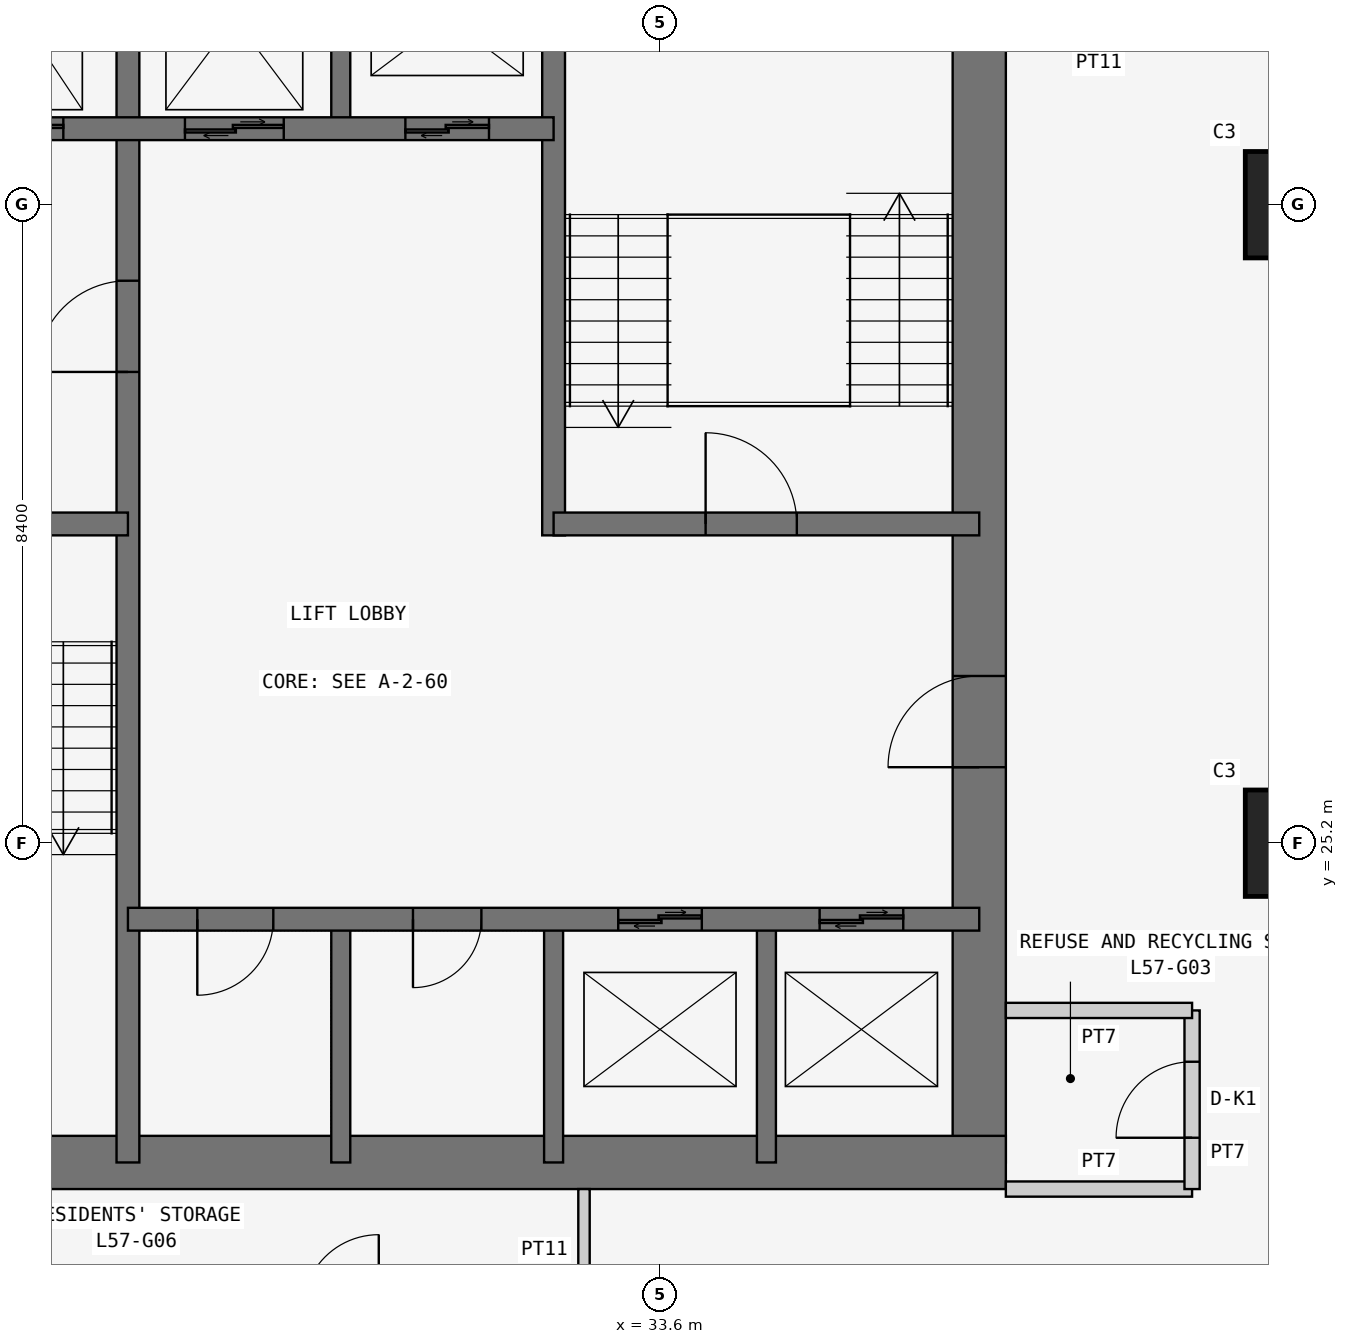
"""IFC4 building model, lengths in metres.
Left out: names, types, materials, properties, quantities, classifications, styles, units other than length and angle.
Written with IfcOpenShell. Run it as: python <this file> out.ifc"""

import sys

from ifc_helpers import new_model, si_unit, direction, frame, frame_2d, origin, origin_2d, place, context, subcontext, project, spatial, rectangle, extrude, element, fill, save


model = new_model("IFC4")
c1 = context("Model", 3, precision=1e-05, world=origin(), true_north=direction((0.0, 1.0)))
c2 = subcontext(c1, "Body", "Model", "MODEL_VIEW")
j1 = project(units=[si_unit("LENGTHUNIT", "METRE"), si_unit("PLANEANGLEUNIT", "RADIAN")], contexts=[c1])
p1 = place(None, origin())
s1 = spatial("IfcSite", under=j1, at=p1, CompositionType="ELEMENT")
p2 = place(p1, origin())
s2 = spatial("IfcBuilding", under=s1, at=p2, CompositionType="ELEMENT")
p3 = place(p2, frame((0.0, 0.0, 219.3)))
s3 = spatial("IfcBuildingStorey", under=s2, at=p3, CompositionType="ELEMENT", Elevation=219.3)
for number, where, z_axis, x_axis in (
    (1, (42.0, 25.2, 0.0), (0.0, 0.0, 1.0), (1.0, 0.0, 0.0)),
    (2, (42.0, 33.6, 0.0), (0.0, 0.0, 1.0), (1.0, 0.0, 0.0)),
):
    element("IfcColumn", number, at=place(p3, frame(where, z_axis=z_axis, x_axis=x_axis)), inside=s3, PredefinedType="COLUMN", context=c2, shape_type="SweptSolid", body=[
        extrude(rectangle(XDim=1.4, YDim=1.4, at=origin_2d()), origin(), (0.0, 0.0, 1.0), 3.6),
    ])
p4 = place(p3, frame((21.0, 21.0, 0.0), z_axis=(0.0, 0.0, 1.0), x_axis=(1.0, 0.0, 0.0)))
e3 = element("IfcWall", 3, at=p4, inside=s3, PredefinedType="SHEAR", context=c2, shape_type="SweptSolid", body=[
    extrude(rectangle(XDim=17.15, YDim=0.7, at=frame_2d((8.575, 0.0))), origin(), (0.0, 0.0, 1.0), 3.6),
])
p5 = place(p3, frame((37.8, 21.0, 0.0), z_axis=(0.0, 0.0, 1.0), x_axis=(0.0, 1.0, 0.0)))
e4 = element("IfcWall", 4, at=p5, inside=s3, PredefinedType="SHEAR", context=c2, shape_type="SweptSolid", body=[
    extrude(rectangle(XDim=17.15, YDim=0.7, at=frame_2d((8.575, 0.0))), origin(), (0.0, 0.0, 1.0), 3.6),
])
p6 = place(p5, frame((5.2, 0.0, 0.0)))
e5 = element("IfcOpeningElement", 5, at=p6, cuts=e4, PredefinedType="OPENING", context=c2, shape_type="SweptSolid", body=[
    extrude(rectangle(XDim=1.2, YDim=2.1, at=frame_2d((0.6, 1.05))), frame((0.0, 0.36, 0.0), z_axis=(0.0, -1.0, 0.0), x_axis=(1.0, 0.0, 0.0)), (0.0, 0.0, 1.0), 0.72),
])
p7 = place(p3, frame((26.6, 21.0, 0.0), z_axis=(0.0, 0.0, 1.0), x_axis=(0.0, 1.0, 0.0)))
e6 = element("IfcWall", 6, at=p7, inside=s3, PredefinedType="SHEAR", context=c2, shape_type="SweptSolid", body=[
    extrude(rectangle(XDim=16.8, YDim=0.3, at=frame_2d((8.4, 0.0))), origin(), (0.0, 0.0, 1.0), 3.6),
])
p8 = place(p7, frame((10.4, 0.0, 0.0)))
e7 = element("IfcOpeningElement", 7, at=p8, cuts=e6, PredefinedType="OPENING", context=c2, shape_type="SweptSolid", body=[
    extrude(rectangle(XDim=1.2, YDim=2.1, at=frame_2d((0.6, 1.05))), frame((0.0, 0.16, 0.0), z_axis=(0.0, -1.0, 0.0), x_axis=(1.0, 0.0, 0.0)), (0.0, 0.0, 1.0), 0.32),
])
p9 = place(p3, frame((21.0, 29.4, 0.0), z_axis=(0.0, 0.0, 1.0), x_axis=(1.0, 0.0, 0.0)))
e8 = element("IfcWall", 8, at=p9, inside=s3, PredefinedType="SHEAR", context=c2, shape_type="SweptSolid", body=[
    extrude(rectangle(XDim=5.6, YDim=0.3, at=frame_2d((2.8, 0.0))), origin(), (0.0, 0.0, 1.0), 3.6),
])
p10 = place(p9, frame((2.3, 0.0, 0.0)))
e9 = element("IfcOpeningElement", 9, at=p10, cuts=e8, PredefinedType="OPENING", context=c2, shape_type="SweptSolid", body=[
    extrude(rectangle(XDim=1.2, YDim=2.1, at=frame_2d((0.6, 1.05))), frame((0.0, 0.16, 0.0), z_axis=(0.0, -1.0, 0.0), x_axis=(1.0, 0.0, 0.0)), (0.0, 0.0, 1.0), 0.32),
])
p11 = place(p3, frame((21.0, 34.6, 0.0), z_axis=(0.0, 0.0, 1.0), x_axis=(1.0, 0.0, 0.0)))
e10 = element("IfcWall", 10, at=p11, inside=s3, PredefinedType="SHEAR", context=c2, shape_type="SweptSolid", body=[
    extrude(rectangle(XDim=11.2, YDim=0.3, at=frame_2d((5.6, 0.0))), origin(), (0.0, 0.0, 1.0), 3.6),
])
p12 = place(p11, frame((9.25, 0.0, 0.0)))
e11 = element("IfcOpeningElement", 11, at=p12, cuts=e10, PredefinedType="OPENING", context=c2, shape_type="SweptSolid", body=[
    extrude(rectangle(XDim=1.1, YDim=2.1, at=frame_2d((0.55, 1.05))), frame((0.0, 0.16, 0.0), z_axis=(0.0, -1.0, 0.0), x_axis=(1.0, 0.0, 0.0)), (0.0, 0.0, 1.0), 0.32),
])
p13 = place(p11, frame((1.0, 0.0, 0.0)))
e12 = element("IfcOpeningElement", 12, at=p13, cuts=e10, PredefinedType="OPENING", context=c2, shape_type="SweptSolid", body=[
    extrude(rectangle(XDim=1.1, YDim=2.1, at=frame_2d((0.55, 1.05))), frame((0.0, 0.16, 0.0), z_axis=(0.0, -1.0, 0.0), x_axis=(1.0, 0.0, 0.0)), (0.0, 0.0, 1.0), 0.32),
])
p14 = place(p11, frame((3.65, 0.0, 0.0)))
e13 = element("IfcOpeningElement", 13, at=p14, cuts=e10, PredefinedType="OPENING", context=c2, shape_type="SweptSolid", body=[
    extrude(rectangle(XDim=1.1, YDim=2.1, at=frame_2d((0.55, 1.05))), frame((0.0, 0.16, 0.0), z_axis=(0.0, -1.0, 0.0), x_axis=(1.0, 0.0, 0.0)), (0.0, 0.0, 1.0), 0.32),
])
p15 = place(p11, frame((6.35, 0.0, 0.0)))
e14 = element("IfcOpeningElement", 14, at=p15, cuts=e10, PredefinedType="OPENING", context=c2, shape_type="SweptSolid", body=[
    extrude(rectangle(XDim=1.3, YDim=2.1, at=frame_2d((0.65, 1.05))), frame((0.0, 0.16, 0.0), z_axis=(0.0, -1.0, 0.0), x_axis=(1.0, 0.0, 0.0)), (0.0, 0.0, 1.0), 0.32),
])
p16 = place(p3, frame((26.6, 24.2, 0.0), z_axis=(0.0, 0.0, 1.0), x_axis=(1.0, 0.0, 0.0)))
e15 = element("IfcWall", 15, at=p16, inside=s3, PredefinedType="SHEAR", context=c2, shape_type="SweptSolid", body=[
    extrude(rectangle(XDim=11.2, YDim=0.3, at=frame_2d((5.6, 0.0))), origin(), (0.0, 0.0, 1.0), 3.6),
])
p17 = place(p16, frame((0.913, 0.0, 0.0)))
e16 = element("IfcOpeningElement", 16, at=p17, cuts=e15, PredefinedType="OPENING", context=c2, shape_type="SweptSolid", body=[
    extrude(rectangle(XDim=1.0, YDim=2.1, at=frame_2d((0.5, 1.05))), frame((0.0, 0.16, 0.0), z_axis=(0.0, -1.0, 0.0), x_axis=(1.0, 0.0, 0.0)), (0.0, 0.0, 1.0), 0.32),
])
p18 = place(p16, frame((3.75, 0.0, 0.0)))
e17 = element("IfcOpeningElement", 17, at=p18, cuts=e15, PredefinedType="OPENING", context=c2, shape_type="SweptSolid", body=[
    extrude(rectangle(XDim=0.9, YDim=2.1, at=frame_2d((0.45, 1.05))), frame((0.0, 0.16, 0.0), z_axis=(0.0, -1.0, 0.0), x_axis=(1.0, 0.0, 0.0)), (0.0, 0.0, 1.0), 0.32),
])
p19 = place(p16, frame((6.45, 0.0, 0.0)))
e18 = element("IfcOpeningElement", 18, at=p19, cuts=e15, PredefinedType="OPENING", context=c2, shape_type="SweptSolid", body=[
    extrude(rectangle(XDim=1.1, YDim=2.1, at=frame_2d((0.55, 1.05))), frame((0.0, 0.16, 0.0), z_axis=(0.0, -1.0, 0.0), x_axis=(1.0, 0.0, 0.0)), (0.0, 0.0, 1.0), 0.32),
])
p20 = place(p16, frame((9.1, 0.0, 0.0)))
e19 = element("IfcOpeningElement", 19, at=p20, cuts=e15, PredefinedType="OPENING", context=c2, shape_type="SweptSolid", body=[
    extrude(rectangle(XDim=1.1, YDim=2.1, at=frame_2d((0.55, 1.05))), frame((0.0, 0.16, 0.0), z_axis=(0.0, -1.0, 0.0), x_axis=(1.0, 0.0, 0.0)), (0.0, 0.0, 1.0), 0.32),
])
p21 = place(p3, frame((32.2, 29.25, 0.0), z_axis=(0.0, 0.0, 1.0), x_axis=(0.0, 1.0, 0.0)))
e20 = element("IfcWall", 20, at=p21, inside=s3, PredefinedType="SHEAR", context=c2, shape_type="SweptSolid", body=[
    extrude(rectangle(XDim=8.55, YDim=0.3, at=frame_2d((4.275, 0.0))), origin(), (0.0, 0.0, 1.0), 3.6),
])
p22 = place(p3, frame((32.2, 29.4, 0.0), z_axis=(0.0, 0.0, 1.0), x_axis=(1.0, 0.0, 0.0)))
e21 = element("IfcWall", 21, at=p22, inside=s3, PredefinedType="SHEAR", context=c2, shape_type="SweptSolid", body=[
    extrude(rectangle(XDim=5.6, YDim=0.3, at=frame_2d((2.8, 0.0))), origin(), (0.0, 0.0, 1.0), 3.6),
])
p23 = place(p22, frame((2.0, 0.0, 0.0)))
e22 = element("IfcOpeningElement", 22, at=p23, cuts=e21, PredefinedType="OPENING", context=c2, shape_type="SweptSolid", body=[
    extrude(rectangle(XDim=1.2, YDim=2.1, at=frame_2d((0.6, 1.05))), frame((0.0, 0.16, 0.0), z_axis=(0.0, -1.0, 0.0), x_axis=(1.0, 0.0, 0.0)), (0.0, 0.0, 1.0), 0.32),
])
for number, where, z_axis, x_axis in (
    (23, (29.4, 21.0, 0.0), (0.0, 0.0, 1.0), (0.0, 1.0, 0.0)),
    (24, (32.2, 21.0, 0.0), (0.0, 0.0, 1.0), (0.0, 1.0, 0.0)),
    (25, (35.0, 21.0, 0.0), (0.0, 0.0, 1.0), (0.0, 1.0, 0.0)),
    (26, (29.4, 34.6, 0.0), (0.0, 0.0, 1.0), (0.0, 1.0, 0.0)),
):
    element("IfcWall", number, at=place(p3, frame(where, z_axis=z_axis, x_axis=x_axis)), inside=s3, PredefinedType="SHEAR", context=c2, shape_type="SweptSolid", body=[
        extrude(rectangle(XDim=3.2, YDim=0.25, at=frame_2d((1.6, 0.0))), origin(), (0.0, 0.0, 1.0), 3.6),
    ])
p24 = place(p3, frame((38.15, 20.65, 0.0), z_axis=(0.0, 0.0, 1.0), x_axis=(1.0, 0.0, 0.0)))
e27 = element("IfcWall", 27, at=p24, inside=s3, PredefinedType="PARTITIONING", context=c2, shape_type="SweptSolid", body=[
    extrude(rectangle(XDim=2.45, YDim=0.2, at=frame_2d((1.225, 0.0))), origin(), (0.0, 0.0, 1.0), 3.45),
])
p25 = place(p3, frame((40.6, 20.65, 0.0), z_axis=(0.0, 0.0, 1.0), x_axis=(0.0, 1.0, 0.0)))
e28 = element("IfcWall", 28, at=p25, inside=s3, PredefinedType="PARTITIONING", context=c2, shape_type="SweptSolid", body=[
    extrude(rectangle(XDim=2.35, YDim=0.2, at=frame_2d((1.175, 0.0))), origin(), (0.0, 0.0, 1.0), 3.45),
])
p26 = place(p25, frame((0.675, 0.0, 0.0)))
e29 = element("IfcOpeningElement", 29, at=p26, cuts=e28, PredefinedType="OPENING", context=c2, shape_type="SweptSolid", body=[
    extrude(rectangle(XDim=1.0, YDim=2.1, at=frame_2d((0.5, 1.05))), frame((0.0, 0.11, 0.0), z_axis=(0.0, -1.0, 0.0), x_axis=(1.0, 0.0, 0.0)), (0.0, 0.0, 1.0), 0.22),
])
p27 = place(p3, frame((40.6, 23.0, 0.0), z_axis=(0.0, 0.0, 1.0), x_axis=(-1.0, 0.0, 0.0)))
e30 = element("IfcWall", 30, at=p27, inside=s3, PredefinedType="PARTITIONING", context=c2, shape_type="SweptSolid", body=[
    extrude(rectangle(XDim=2.45, YDim=0.2, at=frame_2d((1.225, 0.0))), origin(), (0.0, 0.0, 1.0), 3.45),
])
p28 = place(p3, frame((32.6, 19.05, 0.0), z_axis=(0.0, 0.0, 1.0), x_axis=(0.0, 1.0, 0.0)))
e31 = element("IfcWall", 31, at=p28, inside=s3, PredefinedType="PARTITIONING", context=c2, shape_type="SweptSolid", body=[
    extrude(rectangle(XDim=1.6, YDim=0.15, at=frame_2d((0.8, 0.0))), origin(), (0.0, 0.0, 1.0), 3.45),
])
p29 = place(p26, origin())
e32 = element("IfcDoor", 32, at=p29, inside=s3, OperationType="SINGLE_SWING_LEFT", PredefinedType="DOOR", context=c2, shape_type="SweptSolid", body=[
    extrude(rectangle(XDim=1.0, YDim=2.1, at=frame_2d((0.5, 1.05))), frame((0.0, 0.025, 0.0), z_axis=(0.0, -1.0, 0.0), x_axis=(1.0, 0.0, 0.0)), (0.0, 0.0, 1.0), 0.05),
])
fill(e29, e32)
p30 = place(p8, origin())
e33 = element("IfcDoor", 33, at=p30, inside=s3, OperationType="SINGLE_SWING_LEFT", PredefinedType="DOOR", context=c2, shape_type="SweptSolid", body=[
    extrude(rectangle(XDim=1.2, YDim=2.1, at=frame_2d((0.6, 1.05))), frame((0.0, 0.025, 0.0), z_axis=(0.0, -1.0, 0.0), x_axis=(1.0, 0.0, 0.0)), (0.0, 0.0, 1.0), 0.05),
])
fill(e7, e33)
p31 = place(p6, origin())
e34 = element("IfcDoor", 34, at=p31, inside=s3, OperationType="SINGLE_SWING_LEFT", PredefinedType="DOOR", context=c2, shape_type="SweptSolid", body=[
    extrude(rectangle(XDim=1.2, YDim=2.1, at=frame_2d((0.6, 1.05))), frame((0.0, 0.025, 0.0), z_axis=(0.0, -1.0, 0.0), x_axis=(1.0, 0.0, 0.0)), (0.0, 0.0, 1.0), 0.05),
])
fill(e5, e34)
p32 = place(p23, origin())
e35 = element("IfcDoor", 35, at=p32, inside=s3, OperationType="SINGLE_SWING_LEFT", PredefinedType="DOOR", context=c2, shape_type="SweptSolid", body=[
    extrude(rectangle(XDim=1.2, YDim=2.1, at=frame_2d((0.6, 1.05))), frame((0.0, 0.025, 0.0), z_axis=(0.0, -1.0, 0.0), x_axis=(1.0, 0.0, 0.0)), (0.0, 0.0, 1.0), 0.05),
])
fill(e22, e35)
p33 = place(p17, frame((1.0, 0.0, 0.0), z_axis=(0.0, 0.0, 1.0), x_axis=(-1.0, 0.0, 0.0)))
e36 = element("IfcDoor", 36, at=p33, inside=s3, OperationType="SINGLE_SWING_RIGHT", PredefinedType="DOOR", context=c2, shape_type="SweptSolid", body=[
    extrude(rectangle(XDim=1.0, YDim=2.1, at=frame_2d((0.5, 1.05))), frame((0.0, 0.025, 0.0), z_axis=(0.0, -1.0, 0.0), x_axis=(1.0, 0.0, 0.0)), (0.0, 0.0, 1.0), 0.05),
])
fill(e16, e36)
p34 = place(p18, frame((0.9, 0.0, 0.0), z_axis=(0.0, 0.0, 1.0), x_axis=(-1.0, 0.0, 0.0)))
e37 = element("IfcDoor", 37, at=p34, inside=s3, OperationType="SINGLE_SWING_RIGHT", PredefinedType="DOOR", context=c2, shape_type="SweptSolid", body=[
    extrude(rectangle(XDim=0.9, YDim=2.1, at=frame_2d((0.45, 1.05))), frame((0.0, 0.025, 0.0), z_axis=(0.0, -1.0, 0.0), x_axis=(1.0, 0.0, 0.0)), (0.0, 0.0, 1.0), 0.05),
])
fill(e17, e37)
p35 = place(p19, origin())
e38 = element("IfcDoor", 38, at=p35, inside=s3, OperationType="DOUBLE_DOOR_SLIDING", PredefinedType="DOOR", context=c2, shape_type="SweptSolid", body=[
    extrude(rectangle(XDim=1.1, YDim=2.1, at=frame_2d((0.55, 1.05))), frame((0.0, 0.025, 0.0), z_axis=(0.0, -1.0, 0.0), x_axis=(1.0, 0.0, 0.0)), (0.0, 0.0, 1.0), 0.05),
])
fill(e18, e38)
p36 = place(p20, origin())
e39 = element("IfcDoor", 39, at=p36, inside=s3, OperationType="DOUBLE_DOOR_SLIDING", PredefinedType="DOOR", context=c2, shape_type="SweptSolid", body=[
    extrude(rectangle(XDim=1.1, YDim=2.1, at=frame_2d((0.55, 1.05))), frame((0.0, 0.025, 0.0), z_axis=(0.0, -1.0, 0.0), x_axis=(1.0, 0.0, 0.0)), (0.0, 0.0, 1.0), 0.05),
])
fill(e19, e39)
p37 = place(p12, origin())
e40 = element("IfcDoor", 40, at=p37, inside=s3, OperationType="DOUBLE_DOOR_SLIDING", PredefinedType="DOOR", context=c2, shape_type="SweptSolid", body=[
    extrude(rectangle(XDim=1.1, YDim=2.1, at=frame_2d((0.55, 1.05))), frame((0.0, 0.025, 0.0), z_axis=(0.0, -1.0, 0.0), x_axis=(1.0, 0.0, 0.0)), (0.0, 0.0, 1.0), 0.05),
])
fill(e11, e40)
p38 = place(p14, origin())
e41 = element("IfcDoor", 41, at=p38, inside=s3, OperationType="DOUBLE_DOOR_SLIDING", PredefinedType="DOOR", context=c2, shape_type="SweptSolid", body=[
    extrude(rectangle(XDim=1.1, YDim=2.1, at=frame_2d((0.55, 1.05))), frame((0.0, 0.025, 0.0), z_axis=(0.0, -1.0, 0.0), x_axis=(1.0, 0.0, 0.0)), (0.0, 0.0, 1.0), 0.05),
])
fill(e13, e41)
p39 = place(p15, origin())
e42 = element("IfcDoor", 42, at=p39, inside=s3, OperationType="DOUBLE_DOOR_SLIDING", PredefinedType="DOOR", context=c2, shape_type="SweptSolid", body=[
    extrude(rectangle(XDim=1.3, YDim=2.1, at=frame_2d((0.65, 1.05))), frame((0.0, 0.025, 0.0), z_axis=(0.0, -1.0, 0.0), x_axis=(1.0, 0.0, 0.0)), (0.0, 0.0, 1.0), 0.05),
])
fill(e14, e42)
save(model, sys.argv[1])
